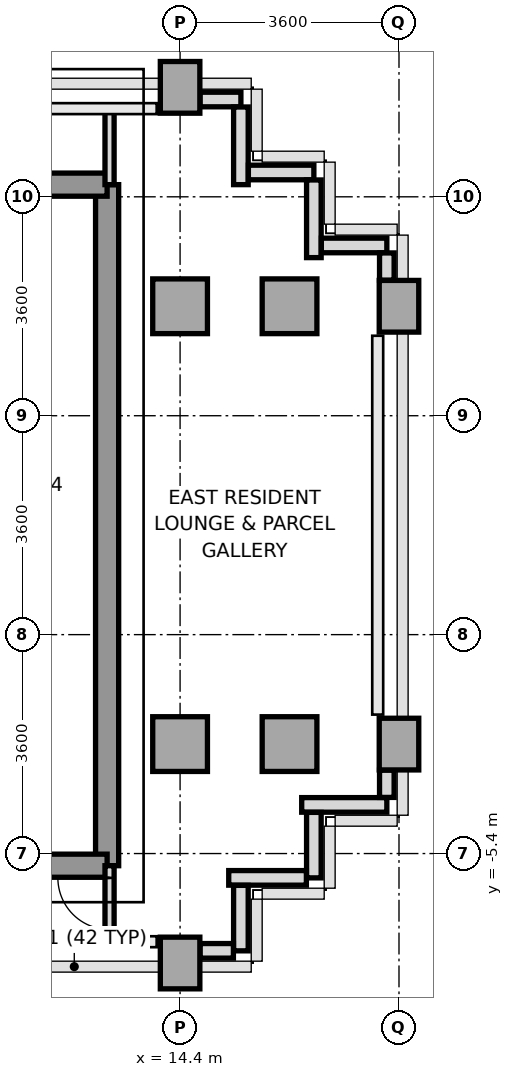
"""IFC4 building model, lengths in metres.
Left out: names, types, materials, properties, quantities, classifications, styles, units other than length and angle.
Written with IfcOpenShell. Run it as: python <this file> out.ifc"""

import sys

from ifc_helpers import new_model, si_unit, direction, frame, frame_2d, origin, origin_2d, place, context, subcontext, project, spatial, rectangle, extrude, source, transform, mapped, element, fill, save


model = new_model("IFC4")
c1 = context("Model", 3, precision=1e-05, world=origin(), true_north=direction((0.0, 1.0)))
c2 = subcontext(c1, "Body", "Model", "MODEL_VIEW")
j1 = project(units=[si_unit("LENGTHUNIT", "METRE"), si_unit("PLANEANGLEUNIT", "RADIAN")], contexts=[c1])
p1 = place(None, origin())
s1 = spatial("IfcSite", under=j1, at=p1, CompositionType="ELEMENT")
p2 = place(p1, origin())
s2 = spatial("IfcBuilding", under=s1, at=p2, CompositionType="ELEMENT")
p3 = place(p2, frame((0.0, 0.0, 208.0)))
s3 = spatial("IfcBuildingStorey", under=s2, at=p3, CompositionType="ELEMENT", Elevation=208.0)
m1 = source(origin(), c2, "Body", "SweptSolid", [
    extrude(rectangle(XDim=0.65, YDim=0.85, at=origin_2d()), origin(), (0.0, 0.0, 1.0), 3.2),
])
p4 = place(p3, frame((14.4, -7.2, 0.0), z_axis=(0.0, 0.0, 1.0), x_axis=(1.0, 0.0, 0.0)))
e1 = element("IfcColumn", 1, at=p4, inside=s3, PredefinedType="COLUMN", context=c2, shape_type="MappedRepresentation", body=[
    mapped(m1, transform((0.0, 0.0, 0.0), x_axis=(1.0, 0.0, 0.0), y_axis=(0.0, 1.0, 0.0), z_axis=(0.0, 0.0, 1.0), scale=1.0)),
])
m2 = source(origin(), c2, "Body", "SweptSolid", [
    extrude(rectangle(XDim=0.9, YDim=0.9, at=origin_2d()), origin(), (0.0, 0.0, 1.0), 3.2),
])
for number, where, z_axis, x_axis in (
    (2, (14.4, -3.6, 0.0), (0.0, 0.0, 1.0), (1.0, 0.0, 0.0)),
    (3, (14.4, 3.6, 0.0), (0.0, 0.0, 1.0), (1.0, 0.0, 0.0)),
):
    element("IfcColumn", number, at=place(p3, frame(where, z_axis=z_axis, x_axis=x_axis)), inside=s3, PredefinedType="COLUMN", context=c2, shape_type="MappedRepresentation", body=[
        mapped(m2, transform((0.0, 0.0, 0.0), x_axis=(1.0, 0.0, 0.0), y_axis=(0.0, 1.0, 0.0), z_axis=(0.0, 0.0, 1.0), scale=1.0)),
    ])
p5 = place(p3, frame((14.4, 7.2, 0.0), z_axis=(0.0, 0.0, 1.0), x_axis=(1.0, 0.0, 0.0)))
e4 = element("IfcColumn", 4, at=p5, inside=s3, PredefinedType="COLUMN", context=c2, shape_type="MappedRepresentation", body=[
    mapped(m1, transform((0.0, 0.0, 0.0), x_axis=(1.0, 0.0, 0.0), y_axis=(0.0, 1.0, 0.0), z_axis=(0.0, 0.0, 1.0), scale=1.0)),
])
for number, where, z_axis, x_axis in (
    (5, (16.2, -3.6, 0.0), (0.0, 0.0, 1.0), (1.0, 0.0, 0.0)),
    (6, (16.2, 3.6, 0.0), (0.0, 0.0, 1.0), (1.0, 0.0, 0.0)),
):
    element("IfcColumn", number, at=place(p3, frame(where, z_axis=z_axis, x_axis=x_axis)), inside=s3, PredefinedType="COLUMN", context=c2, shape_type="MappedRepresentation", body=[
        mapped(m2, transform((0.0, 0.0, 0.0), x_axis=(1.0, 0.0, 0.0), y_axis=(0.0, 1.0, 0.0), z_axis=(0.0, 0.0, 1.0), scale=1.0)),
    ])
for number, where, z_axis, x_axis in (
    (7, (18.0, -3.6, 0.0), (0.0, 0.0, 1.0), (1.0, 0.0, 0.0)),
    (8, (18.0, 3.6, 0.0), (0.0, 0.0, 1.0), (1.0, 0.0, 0.0)),
):
    element("IfcColumn", number, at=place(p3, frame(where, z_axis=z_axis, x_axis=x_axis)), inside=s3, PredefinedType="COLUMN", context=c2, shape_type="MappedRepresentation", body=[
        mapped(m1, transform((0.0, 0.0, 0.0), x_axis=(1.0, 0.0, 0.0), y_axis=(0.0, 1.0, 0.0), z_axis=(0.0, 0.0, 1.0), scale=1.0)),
    ])
p6 = place(p3, frame((17.8, -4.6, 0.0), z_axis=(0.0, 0.0, 1.0), x_axis=(-1.0, 0.0, 0.0)))
e9 = element("IfcWall", 9, at=p6, inside=s3, PredefinedType="PARAPET", context=c2, shape_type="SweptSolid", body=[
    extrude(rectangle(XDim=1.4, YDim=0.24, at=frame_2d((0.7, 0.0))), origin(), (0.0, 0.0, 1.0), 1.15),
])
p7 = place(p3, frame((16.6, -4.723, 0.0), z_axis=(0.0, 0.0, 1.0), x_axis=(0.0, -1.0, 0.0)))
e10 = element("IfcWall", 10, at=p7, inside=s3, PredefinedType="PARAPET", context=c2, shape_type="SweptSolid", body=[
    extrude(rectangle(XDim=1.077, YDim=0.24, at=frame_2d((0.539, 0.0))), origin(), (0.0, 0.0, 1.0), 1.15),
])
p8 = place(p3, frame((16.477, -5.8, 0.0), z_axis=(0.0, 0.0, 1.0), x_axis=(-1.0, 0.0, 0.0)))
e11 = element("IfcWall", 11, at=p8, inside=s3, PredefinedType="PARAPET", context=c2, shape_type="SweptSolid", body=[
    extrude(rectangle(XDim=1.277, YDim=0.24, at=frame_2d((0.639, 0.0))), origin(), (0.0, 0.0, 1.0), 1.15),
])
p9 = place(p3, frame((15.4, -5.923, 0.0), z_axis=(0.0, 0.0, 1.0), x_axis=(0.0, -1.0, 0.0)))
e12 = element("IfcWall", 12, at=p9, inside=s3, PredefinedType="PARAPET", context=c2, shape_type="SweptSolid", body=[
    extrude(rectangle(XDim=1.077, YDim=0.24, at=frame_2d((0.539, 0.0))), origin(), (0.0, 0.0, 1.0), 1.15),
])
p10 = place(p3, frame((15.277, -7.0, 0.0), z_axis=(0.0, 0.0, 1.0), x_axis=(-1.0, 0.0, 0.0)))
e13 = element("IfcWall", 13, at=p10, inside=s3, PredefinedType="PARAPET", context=c2, shape_type="SweptSolid", body=[
    extrude(rectangle(XDim=0.549, YDim=0.24, at=frame_2d((0.274, 0.0))), origin(), (0.0, 0.0, 1.0), 1.15),
])
p11 = place(p3, frame((14.728, 7.0, 0.0), z_axis=(0.0, 0.0, 1.0), x_axis=(1.0, 0.0, 0.0)))
e14 = element("IfcWall", 14, at=p11, inside=s3, PredefinedType="PARAPET", context=c2, shape_type="SweptSolid", body=[
    extrude(rectangle(XDim=0.672, YDim=0.24, at=frame_2d((0.336, 0.0))), origin(), (0.0, 0.0, 1.0), 1.15),
])
p12 = place(p3, frame((15.4, 6.877, 0.0), z_axis=(0.0, 0.0, 1.0), x_axis=(0.0, -1.0, 0.0)))
e15 = element("IfcWall", 15, at=p12, inside=s3, PredefinedType="PARAPET", context=c2, shape_type="SweptSolid", body=[
    extrude(rectangle(XDim=1.277, YDim=0.24, at=frame_2d((0.638, 0.0))), origin(), (0.0, 0.0, 1.0), 1.15),
])
p13 = place(p3, frame((15.523, 5.8, 0.0), z_axis=(0.0, 0.0, 1.0), x_axis=(1.0, 0.0, 0.0)))
e16 = element("IfcWall", 16, at=p13, inside=s3, PredefinedType="PARAPET", context=c2, shape_type="SweptSolid", body=[
    extrude(rectangle(XDim=1.077, YDim=0.24, at=frame_2d((0.539, 0.0))), origin(), (0.0, 0.0, 1.0), 1.15),
])
p14 = place(p3, frame((16.6, 5.677, 0.0), z_axis=(0.0, 0.0, 1.0), x_axis=(0.0, -1.0, 0.0)))
e17 = element("IfcWall", 17, at=p14, inside=s3, PredefinedType="PARAPET", context=c2, shape_type="SweptSolid", body=[
    extrude(rectangle(XDim=1.277, YDim=0.24, at=frame_2d((0.639, 0.0))), origin(), (0.0, 0.0, 1.0), 1.15),
])
p15 = place(p3, frame((16.723, 4.6, 0.0), z_axis=(0.0, 0.0, 1.0), x_axis=(1.0, 0.0, 0.0)))
e18 = element("IfcWall", 18, at=p15, inside=s3, PredefinedType="PARAPET", context=c2, shape_type="SweptSolid", body=[
    extrude(rectangle(XDim=1.077, YDim=0.24, at=frame_2d((0.539, 0.0))), origin(), (0.0, 0.0, 1.0), 1.15),
])
for number, where, z_axis, x_axis in (
    (19, (17.8, 4.477, 0.0), (0.0, 0.0, 1.0), (0.0, -1.0, 0.0)),
    (20, (17.8, -4.028, 0.0), (0.0, 0.0, 1.0), (0.0, -1.0, 0.0)),
):
    element("IfcWall", number, at=place(p3, frame(where, z_axis=z_axis, x_axis=x_axis)), inside=s3, PredefinedType="PARAPET", context=c2, shape_type="SweptSolid", body=[
        extrude(rectangle(XDim=0.449, YDim=0.24, at=frame_2d((0.225, 0.0))), origin(), (0.0, 0.0, 1.0), 1.15),
    ])
p16 = place(p3, frame((13.2, -5.6, 0.0), z_axis=(0.0, 0.0, 1.0), x_axis=(0.0, 1.0, 0.0)))
e21 = element("IfcWall", 21, at=p16, inside=s3, PredefinedType="SHEAR", context=c2, shape_type="SweptSolid", body=[
    extrude(rectangle(XDim=11.2, YDim=0.38, at=frame_2d((5.6, 0.0))), origin(), (0.0, 0.0, 1.0), 3.2),
])
p17 = place(p3, frame((11.356, 5.6, 0.0), z_axis=(0.0, 0.0, 1.0), x_axis=(1.0, 0.0, 0.0)))
e22 = element("IfcWall", 22, at=p17, inside=s3, PredefinedType="SHEAR", context=c2, shape_type="SweptSolid", body=[
    extrude(rectangle(XDim=1.844, YDim=0.38, at=frame_2d((0.922, 0.0))), origin(), (0.0, 0.0, 1.0), 3.2),
])
p18 = place(p3, frame((5.4, -5.6, 0.0), z_axis=(0.0, 0.0, 1.0), x_axis=(1.0, 0.0, 0.0)))
e23 = element("IfcWall", 23, at=p18, inside=s3, PredefinedType="SHEAR", context=c2, shape_type="SweptSolid", body=[
    extrude(rectangle(XDim=7.8, YDim=0.38, at=frame_2d((3.9, 0.0))), origin(), (0.0, 0.0, 1.0), 3.2),
])
p19 = place(p3, frame((13.24, 5.6, 0.0), z_axis=(0.0, 0.0, 1.0), x_axis=(0.0, 1.0, 0.0)))
e24 = element("IfcWall", 24, at=p19, inside=s3, PredefinedType="PARTITIONING", context=c2, shape_type="SweptSolid", body=[
    extrude(rectangle(XDim=1.25, YDim=0.15, at=frame_2d((0.625, 0.0))), origin(), (0.0, 0.0, 1.0), 3.2),
])
p20 = place(p3, frame((13.24, -6.85, 0.0), z_axis=(0.0, 0.0, 1.0), x_axis=(0.0, 1.0, 0.0)))
e25 = element("IfcWall", 25, at=p20, inside=s3, PredefinedType="PARTITIONING", context=c2, shape_type="SweptSolid", body=[
    extrude(rectangle(XDim=1.25, YDim=0.15, at=frame_2d((0.625, 0.0))), origin(), (0.0, 0.0, 1.0), 3.2),
])
p21 = place(p20, frame((0.2, 0.0, 0.0)))
e26 = element("IfcOpeningElement", 26, at=p21, cuts=e25, PredefinedType="OPENING", context=c2, shape_type="SweptSolid", body=[
    extrude(rectangle(XDim=0.85, YDim=2.1, at=frame_2d((0.425, 1.05))), frame((0.0, 0.085, 0.0), z_axis=(0.0, -1.0, 0.0), x_axis=(1.0, 0.0, 0.0)), (0.0, 0.0, 1.0), 0.17),
])
m3 = source(origin(), c2, "Body", "SweptSolid", [
    extrude(rectangle(XDim=0.85, YDim=2.1, at=frame_2d((0.425, 1.05))), frame((0.0, 0.025, 0.0), z_axis=(0.0, -1.0, 0.0), x_axis=(1.0, 0.0, 0.0)), (0.0, 0.0, 1.0), 0.05),
])
p22 = place(p21, origin())
e27 = element("IfcDoor", 27, at=p22, inside=s3, OperationType="SINGLE_SWING_RIGHT", PredefinedType="DOOR", context=c2, shape_type="MappedRepresentation", body=[
    mapped(m3, transform((0.0, 0.0, 0.0), x_axis=(1.0, 0.0, 0.0), y_axis=(0.0, 1.0, 0.0), z_axis=(0.0, 0.0, 1.0), scale=1.0)),
])
fill(e26, e27)
save(model, sys.argv[1])
